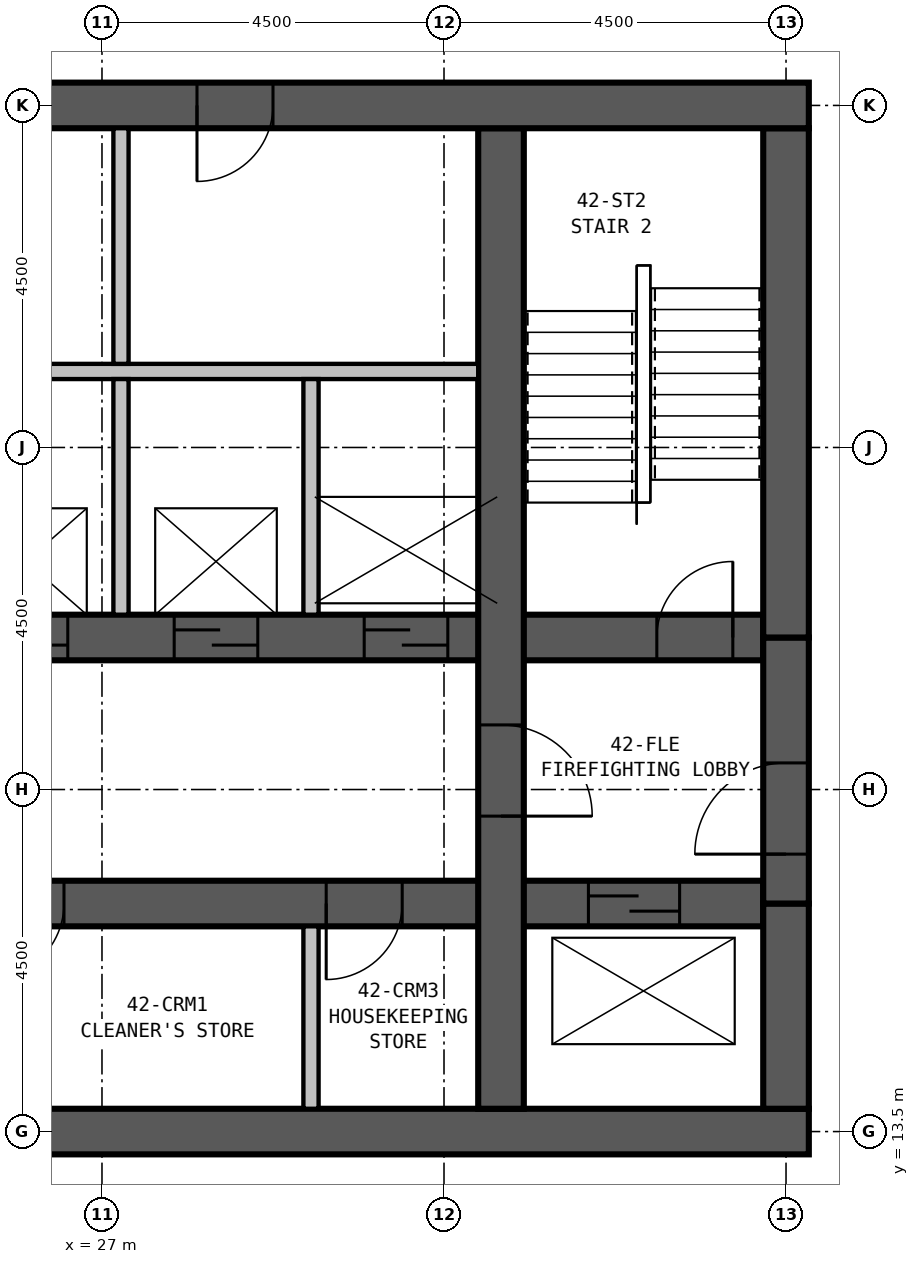
"""IFC4 building model, lengths in metres.
Left out: names, types, materials, properties, quantities, classifications, styles, units other than length and angle.
Written with IfcOpenShell. Run it as: python <this file> out.ifc"""

import sys

from ifc_helpers import new_model, si_unit, direction, frame, frame_2d, origin, place, context, subcontext, project, spatial, rectangle, extrude, element, fill, save


model = new_model("IFC4")
c1 = context("Model", 3, precision=1e-05, world=origin(), true_north=direction((0.0, 1.0)))
c2 = subcontext(c1, "Body", "Model", "MODEL_VIEW")
j1 = project(units=[si_unit("LENGTHUNIT", "METRE"), si_unit("PLANEANGLEUNIT", "RADIAN")], contexts=[c1])
p1 = place(None, origin())
s1 = spatial("IfcSite", under=j1, at=p1, CompositionType="ELEMENT")
p2 = place(p1, origin())
s2 = spatial("IfcBuilding", under=s1, at=p2, CompositionType="ELEMENT")
p3 = place(p2, frame((0.0, 0.0, 165.9)))
s3 = spatial("IfcBuildingStorey", under=s2, at=p3, CompositionType="ELEMENT", Elevation=165.9)
p4 = place(p3, frame((13.2, 13.5, 0.0), z_axis=(0.0, 0.0, 1.0), x_axis=(1.0, 0.0, 0.0)))
e1 = element("IfcWall", 1, at=p4, inside=s3, PredefinedType="SHEAR", context=c2, shape_type="SweptSolid", body=[
    extrude(rectangle(XDim=23.1, YDim=0.6, at=frame_2d((11.55, 0.0))), origin(), (0.0, 0.0, 1.0), 3.5),
])
p5 = place(p3, frame((36.3, 27.0, 0.0), z_axis=(0.0, 0.0, 1.0), x_axis=(-1.0, 0.0, 0.0)))
e2 = element("IfcWall", 2, at=p5, inside=s3, PredefinedType="SHEAR", context=c2, shape_type="SweptSolid", body=[
    extrude(rectangle(XDim=23.1, YDim=0.6, at=frame_2d((11.55, 0.0))), origin(), (0.0, 0.0, 1.0), 3.5),
])
p6 = place(p5, frame((17.05, 0.0, 0.0)))
e3 = element("IfcOpeningElement", 3, at=p6, cuts=e2, PredefinedType="OPENING", context=c2, shape_type="SweptSolid", body=[
    extrude(rectangle(XDim=1.0, YDim=2.1, at=frame_2d((0.5, 1.05))), frame((0.0, 0.31, 0.0), z_axis=(0.0, -1.0, 0.0), x_axis=(1.0, 0.0, 0.0)), (0.0, 0.0, 1.0), 0.62),
])
p7 = place(p5, frame((12.05, 0.0, 0.0)))
e4 = element("IfcOpeningElement", 4, at=p7, cuts=e2, PredefinedType="OPENING", context=c2, shape_type="SweptSolid", body=[
    extrude(rectangle(XDim=1.0, YDim=2.1, at=frame_2d((0.5, 1.05))), frame((0.0, 0.31, 0.0), z_axis=(0.0, -1.0, 0.0), x_axis=(1.0, 0.0, 0.0)), (0.0, 0.0, 1.0), 0.62),
])
p8 = place(p5, frame((7.05, 0.0, 0.0)))
e5 = element("IfcOpeningElement", 5, at=p8, cuts=e2, PredefinedType="OPENING", context=c2, shape_type="SweptSolid", body=[
    extrude(rectangle(XDim=1.0, YDim=2.1, at=frame_2d((0.5, 1.05))), frame((0.0, 0.31, 0.0), z_axis=(0.0, -1.0, 0.0), x_axis=(1.0, 0.0, 0.0)), (0.0, 0.0, 1.0), 0.62),
])
p9 = place(p3, frame((32.25, 13.8, 0.0), z_axis=(0.0, 0.0, 1.0), x_axis=(0.0, 1.0, 0.0)))
e6 = element("IfcWall", 6, at=p9, inside=s3, PredefinedType="SHEAR", context=c2, shape_type="SweptSolid", body=[
    extrude(rectangle(XDim=12.9, YDim=0.6, at=frame_2d((6.45, 0.0))), origin(), (0.0, 0.0, 1.0), 3.5),
])
p10 = place(p9, frame((5.05, 0.0, 0.0), z_axis=(0.0, 0.0, 1.0), x_axis=(-1.0, 0.0, 0.0)))
e7 = element("IfcOpeningElement", 7, at=p10, cuts=e6, PredefinedType="OPENING", context=c2, shape_type="SweptSolid", body=[
    extrude(rectangle(XDim=1.2, YDim=2.1, at=frame_2d((0.6, 1.05))), frame((0.0, 0.31, 0.0), z_axis=(0.0, -1.0, 0.0), x_axis=(1.0, 0.0, 0.0)), (0.0, 0.0, 1.0), 0.62),
])
p11 = place(p3, frame((13.8, 16.5, 0.0), z_axis=(0.0, 0.0, 1.0), x_axis=(1.0, 0.0, 0.0)))
e8 = element("IfcWall", 8, at=p11, inside=s3, PredefinedType="SHEAR", context=c2, shape_type="SweptSolid", body=[
    extrude(rectangle(XDim=21.9, YDim=0.6, at=frame_2d((10.95, 0.0))), origin(), (0.0, 0.0, 1.0), 3.5),
])
p12 = place(p11, frame((5.75, 0.0, 0.0), z_axis=(0.0, 0.0, 1.0), x_axis=(-1.0, 0.0, 0.0)))
e9 = element("IfcOpeningElement", 9, at=p12, cuts=e8, PredefinedType="OPENING", context=c2, shape_type="SweptSolid", body=[
    extrude(rectangle(XDim=1.0, YDim=2.1, at=frame_2d((0.5, 1.05))), frame((0.0, 0.31, 0.0), z_axis=(0.0, -1.0, 0.0), x_axis=(1.0, 0.0, 0.0)), (0.0, 0.0, 1.0), 0.62),
])
p13 = place(p11, frame((10.2, 0.0, 0.0), z_axis=(0.0, 0.0, 1.0), x_axis=(-1.0, 0.0, 0.0)))
e10 = element("IfcOpeningElement", 10, at=p13, cuts=e8, PredefinedType="OPENING", context=c2, shape_type="SweptSolid", body=[
    extrude(rectangle(XDim=1.0, YDim=2.1, at=frame_2d((0.5, 1.05))), frame((0.0, 0.31, 0.0), z_axis=(0.0, -1.0, 0.0), x_axis=(1.0, 0.0, 0.0)), (0.0, 0.0, 1.0), 0.62),
])
p14 = place(p11, frame((12.7, 0.0, 0.0), z_axis=(0.0, 0.0, 1.0), x_axis=(-1.0, 0.0, 0.0)))
e11 = element("IfcOpeningElement", 11, at=p14, cuts=e8, PredefinedType="OPENING", context=c2, shape_type="SweptSolid", body=[
    extrude(rectangle(XDim=1.0, YDim=2.1, at=frame_2d((0.5, 1.05))), frame((0.0, 0.31, 0.0), z_axis=(0.0, -1.0, 0.0), x_axis=(1.0, 0.0, 0.0)), (0.0, 0.0, 1.0), 0.62),
])
p15 = place(p11, frame((17.15, 0.0, 0.0), z_axis=(0.0, 0.0, 1.0), x_axis=(-1.0, 0.0, 0.0)))
e12 = element("IfcOpeningElement", 12, at=p15, cuts=e8, PredefinedType="OPENING", context=c2, shape_type="SweptSolid", body=[
    extrude(rectangle(XDim=1.0, YDim=2.1, at=frame_2d((0.5, 1.05))), frame((0.0, 0.31, 0.0), z_axis=(0.0, -1.0, 0.0), x_axis=(1.0, 0.0, 0.0)), (0.0, 0.0, 1.0), 0.62),
])
p16 = place(p11, frame((0.6, 0.0, 0.0)))
e13 = element("IfcOpeningElement", 13, at=p16, cuts=e8, PredefinedType="OPENING", context=c2, shape_type="SweptSolid", body=[
    extrude(rectangle(XDim=1.2, YDim=2.1, at=frame_2d((0.6, 1.05))), frame((0.0, 0.31, 0.0), z_axis=(0.0, -1.0, 0.0), x_axis=(1.0, 0.0, 0.0)), (0.0, 0.0, 1.0), 0.62),
])
p17 = place(p11, frame((19.6, 0.0, 0.0)))
e14 = element("IfcOpeningElement", 14, at=p17, cuts=e8, PredefinedType="OPENING", context=c2, shape_type="SweptSolid", body=[
    extrude(rectangle(XDim=1.2, YDim=2.1, at=frame_2d((0.6, 1.05))), frame((0.0, 0.31, 0.0), z_axis=(0.0, -1.0, 0.0), x_axis=(1.0, 0.0, 0.0)), (0.0, 0.0, 1.0), 0.62),
])
p18 = place(p3, frame((13.8, 20.0, 0.0), z_axis=(0.0, 0.0, 1.0), x_axis=(1.0, 0.0, 0.0)))
e15 = element("IfcWall", 15, at=p18, inside=s3, PredefinedType="SHEAR", context=c2, shape_type="SweptSolid", body=[
    extrude(rectangle(XDim=21.9, YDim=0.6, at=frame_2d((10.95, 0.0))), origin(), (0.0, 0.0, 1.0), 3.5),
])
p19 = place(p18, frame((0.5, 0.0, 0.0)))
e16 = element("IfcOpeningElement", 16, at=p19, cuts=e15, PredefinedType="OPENING", context=c2, shape_type="SweptSolid", body=[
    extrude(rectangle(XDim=1.0, YDim=2.1, at=frame_2d((0.5, 1.05))), frame((0.0, 0.31, 0.0), z_axis=(0.0, -1.0, 0.0), x_axis=(1.0, 0.0, 0.0)), (0.0, 0.0, 1.0), 0.62),
])
p20 = place(p18, frame((20.5, 0.0, 0.0)))
e17 = element("IfcOpeningElement", 17, at=p20, cuts=e15, PredefinedType="OPENING", context=c2, shape_type="SweptSolid", body=[
    extrude(rectangle(XDim=1.0, YDim=2.1, at=frame_2d((0.5, 1.05))), frame((0.0, 0.31, 0.0), z_axis=(0.0, -1.0, 0.0), x_axis=(1.0, 0.0, 0.0)), (0.0, 0.0, 1.0), 0.62),
])
p21 = place(p18, frame((9.15, 0.0, 0.0)))
e18 = element("IfcOpeningElement", 18, at=p21, cuts=e15, PredefinedType="OPENING", context=c2, shape_type="SweptSolid", body=[
    extrude(rectangle(XDim=1.1, YDim=2.1, at=frame_2d((0.55, 1.05))), frame((0.0, 0.31, 0.0), z_axis=(0.0, -1.0, 0.0), x_axis=(1.0, 0.0, 0.0)), (0.0, 0.0, 1.0), 0.62),
])
p22 = place(p18, frame((11.65, 0.0, 0.0)))
e19 = element("IfcOpeningElement", 19, at=p22, cuts=e15, PredefinedType="OPENING", context=c2, shape_type="SweptSolid", body=[
    extrude(rectangle(XDim=1.1, YDim=2.1, at=frame_2d((0.55, 1.05))), frame((0.0, 0.31, 0.0), z_axis=(0.0, -1.0, 0.0), x_axis=(1.0, 0.0, 0.0)), (0.0, 0.0, 1.0), 0.62),
])
p23 = place(p18, frame((14.15, 0.0, 0.0)))
e20 = element("IfcOpeningElement", 20, at=p23, cuts=e15, PredefinedType="OPENING", context=c2, shape_type="SweptSolid", body=[
    extrude(rectangle(XDim=1.1, YDim=2.1, at=frame_2d((0.55, 1.05))), frame((0.0, 0.31, 0.0), z_axis=(0.0, -1.0, 0.0), x_axis=(1.0, 0.0, 0.0)), (0.0, 0.0, 1.0), 0.62),
])
p24 = place(p18, frame((16.65, 0.0, 0.0)))
e21 = element("IfcOpeningElement", 21, at=p24, cuts=e15, PredefinedType="OPENING", context=c2, shape_type="SweptSolid", body=[
    extrude(rectangle(XDim=1.1, YDim=2.1, at=frame_2d((0.55, 1.05))), frame((0.0, 0.31, 0.0), z_axis=(0.0, -1.0, 0.0), x_axis=(1.0, 0.0, 0.0)), (0.0, 0.0, 1.0), 0.62),
])
p25 = place(p18, frame((4.75, 0.0, 0.0)))
e22 = element("IfcOpeningElement", 22, at=p25, cuts=e15, PredefinedType="OPENING", context=c2, shape_type="SweptSolid", body=[
    extrude(rectangle(XDim=1.0, YDim=2.1, at=frame_2d((0.5, 1.05))), frame((0.0, 0.31, 0.0), z_axis=(0.0, -1.0, 0.0), x_axis=(1.0, 0.0, 0.0)), (0.0, 0.0, 1.0), 0.62),
])
p26 = place(p18, frame((6.7, 0.0, 0.0)))
e23 = element("IfcOpeningElement", 23, at=p26, cuts=e15, PredefinedType="OPENING", context=c2, shape_type="SweptSolid", body=[
    extrude(rectangle(XDim=1.0, YDim=2.1, at=frame_2d((0.5, 1.05))), frame((0.0, 0.31, 0.0), z_axis=(0.0, -1.0, 0.0), x_axis=(1.0, 0.0, 0.0)), (0.0, 0.0, 1.0), 0.62),
])
p27 = place(p3, frame((36.0, 13.8, 0.0), z_axis=(0.0, 0.0, 1.0), x_axis=(0.0, 1.0, 0.0)))
e24 = element("IfcWall", 24, at=p27, inside=s3, PredefinedType="SHEAR", context=c2, shape_type="SweptSolid", body=[
    extrude(rectangle(XDim=2.7, YDim=0.6, at=frame_2d((1.35, 0.0))), origin(), (0.0, 0.0, 1.0), 3.5),
])
p28 = place(p3, frame((36.0, 16.5, 0.0), z_axis=(0.0, 0.0, 1.0), x_axis=(0.0, 1.0, 0.0)))
e25 = element("IfcWall", 25, at=p28, inside=s3, PredefinedType="SHEAR", context=c2, shape_type="SweptSolid", body=[
    extrude(rectangle(XDim=3.5, YDim=0.6, at=frame_2d((1.75, 0.0))), origin(), (0.0, 0.0, 1.0), 3.5),
])
p29 = place(p28, frame((0.65, 0.0, 0.0)))
e26 = element("IfcOpeningElement", 26, at=p29, cuts=e25, PredefinedType="OPENING", context=c2, shape_type="SweptSolid", body=[
    extrude(rectangle(XDim=1.2, YDim=2.1, at=frame_2d((0.6, 1.05))), frame((0.0, 0.31, 0.0), z_axis=(0.0, -1.0, 0.0), x_axis=(1.0, 0.0, 0.0)), (0.0, 0.0, 1.0), 0.62),
])
p30 = place(p3, frame((36.0, 20.0, 0.0), z_axis=(0.0, 0.0, 1.0), x_axis=(0.0, 1.0, 0.0)))
e27 = element("IfcWall", 27, at=p30, inside=s3, PredefinedType="SHEAR", context=c2, shape_type="SweptSolid", body=[
    extrude(rectangle(XDim=6.7, YDim=0.6, at=frame_2d((3.35, 0.0))), origin(), (0.0, 0.0, 1.0), 3.5),
])
p31 = place(p3, frame((27.25, 20.3, 0.0), z_axis=(0.0, 0.0, 1.0), x_axis=(0.0, 1.0, 0.0)))
e28 = element("IfcWall", 28, at=p31, inside=s3, PredefinedType="PARTITIONING", context=c2, shape_type="SweptSolid", body=[
    extrude(rectangle(XDim=3.1, YDim=0.2, at=frame_2d((1.55, 0.0))), origin(), (0.0, 0.0, 1.0), 3.25),
])
p32 = place(p3, frame((29.75, 13.8, 0.0), z_axis=(0.0, 0.0, 1.0), x_axis=(0.0, 1.0, 0.0)))
e29 = element("IfcWall", 29, at=p32, inside=s3, PredefinedType="PARTITIONING", context=c2, shape_type="SweptSolid", body=[
    extrude(rectangle(XDim=2.4, YDim=0.2, at=frame_2d((1.2, 0.0))), origin(), (0.0, 0.0, 1.0), 3.25),
])
p33 = place(p3, frame((29.75, 20.3, 0.0), z_axis=(0.0, 0.0, 1.0), x_axis=(0.0, 1.0, 0.0)))
e30 = element("IfcWall", 30, at=p33, inside=s3, PredefinedType="PARTITIONING", context=c2, shape_type="SweptSolid", body=[
    extrude(rectangle(XDim=3.1, YDim=0.2, at=frame_2d((1.55, 0.0))), origin(), (0.0, 0.0, 1.0), 3.25),
])
p34 = place(p3, frame((17.55, 23.5, 0.0), z_axis=(0.0, 0.0, 1.0), x_axis=(1.0, 0.0, 0.0)))
e31 = element("IfcWall", 31, at=p34, inside=s3, PredefinedType="PARTITIONING", context=c2, shape_type="SweptSolid", body=[
    extrude(rectangle(XDim=14.4, YDim=0.2, at=frame_2d((7.2, 0.0))), origin(), (0.0, 0.0, 1.0), 3.25),
])
p35 = place(p3, frame((27.25, 23.6, 0.0), z_axis=(0.0, 0.0, 1.0), x_axis=(0.0, 1.0, 0.0)))
e32 = element("IfcWall", 32, at=p35, inside=s3, PredefinedType="PARTITIONING", context=c2, shape_type="SweptSolid", body=[
    extrude(rectangle(XDim=3.1, YDim=0.2, at=frame_2d((1.55, 0.0))), origin(), (0.0, 0.0, 1.0), 3.25),
])
p36 = place(p29, origin())
e33 = element("IfcDoor", 33, at=p36, inside=s3, OperationType="SINGLE_SWING_LEFT", PredefinedType="DOOR", context=c2, shape_type="SweptSolid", body=[
    extrude(rectangle(XDim=1.2, YDim=2.1, at=frame_2d((0.6, 1.05))), frame((0.0, 0.3, 0.0), z_axis=(0.0, -1.0, 0.0), x_axis=(1.0, 0.0, 0.0)), (0.0, 0.0, 1.0), 0.6),
])
fill(e26, e33)
p37 = place(p10, origin())
e34 = element("IfcDoor", 34, at=p37, inside=s3, OperationType="SINGLE_SWING_RIGHT", PredefinedType="DOOR", context=c2, shape_type="SweptSolid", body=[
    extrude(rectangle(XDim=1.2, YDim=2.1, at=frame_2d((0.6, 1.05))), frame((0.0, 0.3, 0.0), z_axis=(0.0, -1.0, 0.0), x_axis=(1.0, 0.0, 0.0)), (0.0, 0.0, 1.0), 0.6),
])
fill(e7, e34)
p38 = place(p20, origin())
e35 = element("IfcDoor", 35, at=p38, inside=s3, OperationType="SINGLE_SWING_RIGHT", PredefinedType="DOOR", context=c2, shape_type="SweptSolid", body=[
    extrude(rectangle(XDim=1.0, YDim=2.1, at=frame_2d((0.5, 1.05))), frame((0.0, 0.3, 0.0), z_axis=(0.0, -1.0, 0.0), x_axis=(1.0, 0.0, 0.0)), (0.0, 0.0, 1.0), 0.6),
])
fill(e17, e35)
p39 = place(p22, origin())
e36 = element("IfcDoor", 36, at=p39, inside=s3, OperationType="SLIDING_TO_LEFT", PredefinedType="DOOR", context=c2, shape_type="SweptSolid", body=[
    extrude(rectangle(XDim=1.1, YDim=2.1, at=frame_2d((0.55, 1.05))), frame((0.0, 0.3, 0.0), z_axis=(0.0, -1.0, 0.0), x_axis=(1.0, 0.0, 0.0)), (0.0, 0.0, 1.0), 0.6),
])
fill(e19, e36)
p40 = place(p23, origin())
e37 = element("IfcDoor", 37, at=p40, inside=s3, OperationType="SLIDING_TO_LEFT", PredefinedType="DOOR", context=c2, shape_type="SweptSolid", body=[
    extrude(rectangle(XDim=1.1, YDim=2.1, at=frame_2d((0.55, 1.05))), frame((0.0, 0.3, 0.0), z_axis=(0.0, -1.0, 0.0), x_axis=(1.0, 0.0, 0.0)), (0.0, 0.0, 1.0), 0.6),
])
fill(e20, e37)
p41 = place(p24, origin())
e38 = element("IfcDoor", 38, at=p41, inside=s3, OperationType="SLIDING_TO_LEFT", PredefinedType="DOOR", context=c2, shape_type="SweptSolid", body=[
    extrude(rectangle(XDim=1.1, YDim=2.1, at=frame_2d((0.55, 1.05))), frame((0.0, 0.3, 0.0), z_axis=(0.0, -1.0, 0.0), x_axis=(1.0, 0.0, 0.0)), (0.0, 0.0, 1.0), 0.6),
])
fill(e21, e38)
p42 = place(p14, origin())
e39 = element("IfcDoor", 39, at=p42, inside=s3, OperationType="SINGLE_SWING_RIGHT", PredefinedType="DOOR", context=c2, shape_type="SweptSolid", body=[
    extrude(rectangle(XDim=1.0, YDim=2.1, at=frame_2d((0.5, 1.05))), frame((0.0, 0.3, 0.0), z_axis=(0.0, -1.0, 0.0), x_axis=(1.0, 0.0, 0.0)), (0.0, 0.0, 1.0), 0.6),
])
fill(e11, e39)
p43 = place(p15, origin())
e40 = element("IfcDoor", 40, at=p43, inside=s3, OperationType="SINGLE_SWING_RIGHT", PredefinedType="DOOR", context=c2, shape_type="SweptSolid", body=[
    extrude(rectangle(XDim=1.0, YDim=2.1, at=frame_2d((0.5, 1.05))), frame((0.0, 0.3, 0.0), z_axis=(0.0, -1.0, 0.0), x_axis=(1.0, 0.0, 0.0)), (0.0, 0.0, 1.0), 0.6),
])
fill(e12, e40)
p44 = place(p17, origin())
e41 = element("IfcDoor", 41, at=p44, inside=s3, OperationType="SLIDING_TO_LEFT", PredefinedType="DOOR", context=c2, shape_type="SweptSolid", body=[
    extrude(rectangle(XDim=1.2, YDim=2.1, at=frame_2d((0.6, 1.05))), frame((0.0, 0.3, 0.0), z_axis=(0.0, -1.0, 0.0), x_axis=(1.0, 0.0, 0.0)), (0.0, 0.0, 1.0), 0.6),
])
fill(e14, e41)
p45 = place(p8, origin())
e42 = element("IfcDoor", 42, at=p45, inside=s3, OperationType="SINGLE_SWING_RIGHT", PredefinedType="DOOR", context=c2, shape_type="SweptSolid", body=[
    extrude(rectangle(XDim=1.0, YDim=2.1, at=frame_2d((0.5, 1.05))), frame((0.0, 0.3, 0.0), z_axis=(0.0, -1.0, 0.0), x_axis=(1.0, 0.0, 0.0)), (0.0, 0.0, 1.0), 0.6),
])
fill(e5, e42)
save(model, sys.argv[1])
